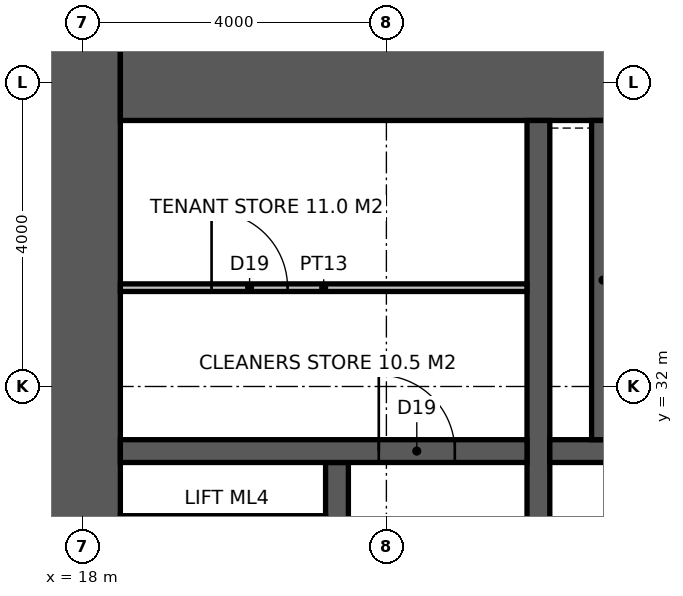
"""IFC4 building model, lengths in metres.
Left out: names, types, materials, properties, quantities, classifications, styles, units other than length and angle.
Written with IfcOpenShell. Run it as: python <this file> out.ifc"""

import sys

from ifc_helpers import new_model, si_unit, direction, frame, frame_2d, origin, place, context, subcontext, project, spatial, rectangle, extrude, element, fill, save


model = new_model("IFC4")
c1 = context("Model", 3, precision=1e-05, world=origin(), true_north=direction((0.0, 1.0)))
c2 = subcontext(c1, "Body", "Model", "MODEL_VIEW")
j1 = project(units=[si_unit("LENGTHUNIT", "METRE"), si_unit("PLANEANGLEUNIT", "RADIAN")], contexts=[c1])
p1 = place(None, origin())
s1 = spatial("IfcSite", under=j1, at=p1, CompositionType="ELEMENT")
p2 = place(p1, origin())
s2 = spatial("IfcBuilding", under=s1, at=p2, CompositionType="ELEMENT")
p3 = place(p2, frame((0.0, 0.0, 93.4)))
s3 = spatial("IfcBuildingStorey", under=s2, at=p3, CompositionType="ELEMENT", Elevation=93.4)
p4 = place(p3, frame((18.0, 17.5, -0.15), z_axis=(0.0, 0.0, 1.0), x_axis=(0.0, 1.0, 0.0)))
e1 = element("IfcWall", 1, at=p4, inside=s3, PredefinedType="SHEAR", context=c2, shape_type="SweptSolid", body=[
    extrude(rectangle(XDim=19.0, YDim=1.0, at=frame_2d((9.5, 0.0))), origin(), (0.0, 0.0, 1.0), 4.0),
])
p5 = place(p3, frame((18.5, 36.0, -0.15), z_axis=(0.0, 0.0, 1.0), x_axis=(1.0, 0.0, 0.0)))
e2 = element("IfcWall", 2, at=p5, inside=s3, PredefinedType="SHEAR", context=c2, shape_type="SweptSolid", body=[
    extrude(rectangle(XDim=17.6, YDim=1.0, at=frame_2d((8.8, 0.0))), origin(), (0.0, 0.0, 1.0), 4.0),
])
p6 = place(p3, frame((24.0, 18.5, -0.15), z_axis=(0.0, 0.0, 1.0), x_axis=(0.0, 1.0, 0.0)))
e3 = element("IfcWall", 3, at=p6, inside=s3, PredefinedType="SHEAR", context=c2, shape_type="SweptSolid", body=[
    extrude(rectangle(XDim=17.0, YDim=0.3, at=frame_2d((8.5, 0.0))), origin(), (0.0, 0.0, 1.0), 4.0),
])
p7 = place(p6, frame((9.6, 0.0, 0.15)))
e4 = element("IfcOpeningElement", 4, at=p7, cuts=e3, PredefinedType="OPENING", context=c2, shape_type="SweptSolid", body=[
    extrude(rectangle(XDim=1.5, YDim=2.4, at=frame_2d((0.75, 1.2))), frame((0.0, 0.16, 0.0), z_axis=(0.0, -1.0, 0.0), x_axis=(1.0, 0.0, 0.0)), (0.0, 0.0, 1.0), 0.32),
])
p8 = place(p3, frame((24.15, 31.15, -0.15), z_axis=(0.0, 0.0, 1.0), x_axis=(1.0, 0.0, 0.0)))
e5 = element("IfcWall", 5, at=p8, inside=s3, PredefinedType="SHEAR", context=c2, shape_type="SweptSolid", body=[
    extrude(rectangle(XDim=11.25, YDim=0.3, at=frame_2d((5.625, 0.0))), origin(), (0.0, 0.0, 1.0), 4.0),
])
p9 = place(p8, frame((7.25, 0.0, 0.15)))
e6 = element("IfcOpeningElement", 6, at=p9, cuts=e5, PredefinedType="OPENING", context=c2, shape_type="SweptSolid", body=[
    extrude(rectangle(XDim=1.4, YDim=2.4, at=frame_2d((0.7, 1.2))), frame((0.0, 0.16, 0.0), z_axis=(0.0, -1.0, 0.0), x_axis=(1.0, 0.0, 0.0)), (0.0, 0.0, 1.0), 0.32),
])
p10 = place(p3, frame((21.35, 18.5, -0.15), z_axis=(0.0, 0.0, 1.0), x_axis=(0.0, 1.0, 0.0)))
e7 = element("IfcWall", 7, at=p10, inside=s3, PredefinedType="SHEAR", context=c2, shape_type="SweptSolid", body=[
    extrude(rectangle(XDim=12.5, YDim=0.3, at=frame_2d((6.25, 0.0))), origin(), (0.0, 0.0, 1.0), 4.0),
])
p11 = place(p10, frame((0.875, 0.0, 0.15)))
e8 = element("IfcOpeningElement", 8, at=p11, cuts=e7, PredefinedType="OPENING", context=c2, shape_type="SweptSolid", body=[
    extrude(rectangle(XDim=1.1, YDim=2.2, at=frame_2d((0.55, 1.1))), frame((0.0, 0.16, 0.0), z_axis=(0.0, -1.0, 0.0), x_axis=(1.0, 0.0, 0.0)), (0.0, 0.0, 1.0), 0.32),
])
p12 = place(p10, frame((3.825, 0.0, 0.15)))
e9 = element("IfcOpeningElement", 9, at=p12, cuts=e7, PredefinedType="OPENING", context=c2, shape_type="SweptSolid", body=[
    extrude(rectangle(XDim=1.1, YDim=2.2, at=frame_2d((0.55, 1.1))), frame((0.0, 0.16, 0.0), z_axis=(0.0, -1.0, 0.0), x_axis=(1.0, 0.0, 0.0)), (0.0, 0.0, 1.0), 0.32),
])
p13 = place(p10, frame((6.675, 0.0, 0.15)))
e10 = element("IfcOpeningElement", 10, at=p13, cuts=e7, PredefinedType="OPENING", context=c2, shape_type="SweptSolid", body=[
    extrude(rectangle(XDim=1.1, YDim=2.2, at=frame_2d((0.55, 1.1))), frame((0.0, 0.16, 0.0), z_axis=(0.0, -1.0, 0.0), x_axis=(1.0, 0.0, 0.0)), (0.0, 0.0, 1.0), 0.32),
])
p14 = place(p10, frame((9.575, 0.0, 0.15)))
e11 = element("IfcOpeningElement", 11, at=p14, cuts=e7, PredefinedType="OPENING", context=c2, shape_type="SweptSolid", body=[
    extrude(rectangle(XDim=1.1, YDim=2.2, at=frame_2d((0.55, 1.1))), frame((0.0, 0.16, 0.0), z_axis=(0.0, -1.0, 0.0), x_axis=(1.0, 0.0, 0.0)), (0.0, 0.0, 1.0), 0.32),
])
p15 = place(p3, frame((18.5, 31.15, -0.15), z_axis=(0.0, 0.0, 1.0), x_axis=(1.0, 0.0, 0.0)))
e12 = element("IfcWall", 12, at=p15, inside=s3, PredefinedType="SHEAR", context=c2, shape_type="SweptSolid", body=[
    extrude(rectangle(XDim=5.35, YDim=0.3, at=frame_2d((2.675, 0.0))), origin(), (0.0, 0.0, 1.0), 4.0),
])
p16 = place(p15, frame((3.4, 0.0, 0.15)))
e13 = element("IfcOpeningElement", 13, at=p16, cuts=e12, PredefinedType="OPENING", context=c2, shape_type="SweptSolid", body=[
    extrude(rectangle(XDim=1.0, YDim=2.2, at=frame_2d((0.5, 1.1))), frame((0.0, 0.16, 0.0), z_axis=(0.0, -1.0, 0.0), x_axis=(1.0, 0.0, 0.0)), (0.0, 0.0, 1.0), 0.32),
])
p17 = place(p3, frame((24.85, 31.3, -0.15), z_axis=(0.0, 0.0, 1.0), x_axis=(0.0, 1.0, 0.0)))
e14 = element("IfcWall", 14, at=p17, inside=s3, PredefinedType="SHEAR", context=c2, shape_type="SweptSolid", body=[
    extrude(rectangle(XDim=4.2, YDim=0.3, at=frame_2d((2.1, 0.0))), origin(), (0.0, 0.0, 1.0), 4.0),
])
p18 = place(p3, frame((18.5, 33.3, 0.0), z_axis=(0.0, 0.0, 1.0), x_axis=(1.0, 0.0, 0.0)))
e15 = element("IfcWall", 15, at=p18, inside=s3, PredefinedType="PARTITIONING", context=c2, shape_type="SweptSolid", body=[
    extrude(rectangle(XDim=5.35, YDim=0.1, at=frame_2d((2.675, 0.0))), origin(), (0.0, 0.0, 1.0), 3.85),
])
p19 = place(p18, frame((1.2, 0.0, 0.0)))
e16 = element("IfcOpeningElement", 16, at=p19, cuts=e15, PredefinedType="OPENING", context=c2, shape_type="SweptSolid", body=[
    extrude(rectangle(XDim=1.0, YDim=2.2, at=frame_2d((0.5, 1.1))), frame((0.0, 0.06, 0.0), z_axis=(0.0, -1.0, 0.0), x_axis=(1.0, 0.0, 0.0)), (0.0, 0.0, 1.0), 0.12),
])
p20 = place(p16, origin())
e17 = element("IfcDoor", 17, at=p20, inside=s3, OperationType="SINGLE_SWING_LEFT", PredefinedType="DOOR", context=c2, shape_type="SweptSolid", body=[
    extrude(rectangle(XDim=1.0, YDim=2.2, at=frame_2d((0.5, 1.1))), frame((0.0, 0.025, 0.0), z_axis=(0.0, -1.0, 0.0), x_axis=(1.0, 0.0, 0.0)), (0.0, 0.0, 1.0), 0.05),
])
fill(e13, e17)
p21 = place(p19, origin())
e18 = element("IfcDoor", 18, at=p21, inside=s3, OperationType="SINGLE_SWING_LEFT", PredefinedType="DOOR", context=c2, shape_type="SweptSolid", body=[
    extrude(rectangle(XDim=1.0, YDim=2.2, at=frame_2d((0.5, 1.1))), frame((0.0, 0.025, 0.0), z_axis=(0.0, -1.0, 0.0), x_axis=(1.0, 0.0, 0.0)), (0.0, 0.0, 1.0), 0.05),
])
fill(e16, e18)
save(model, sys.argv[1])
